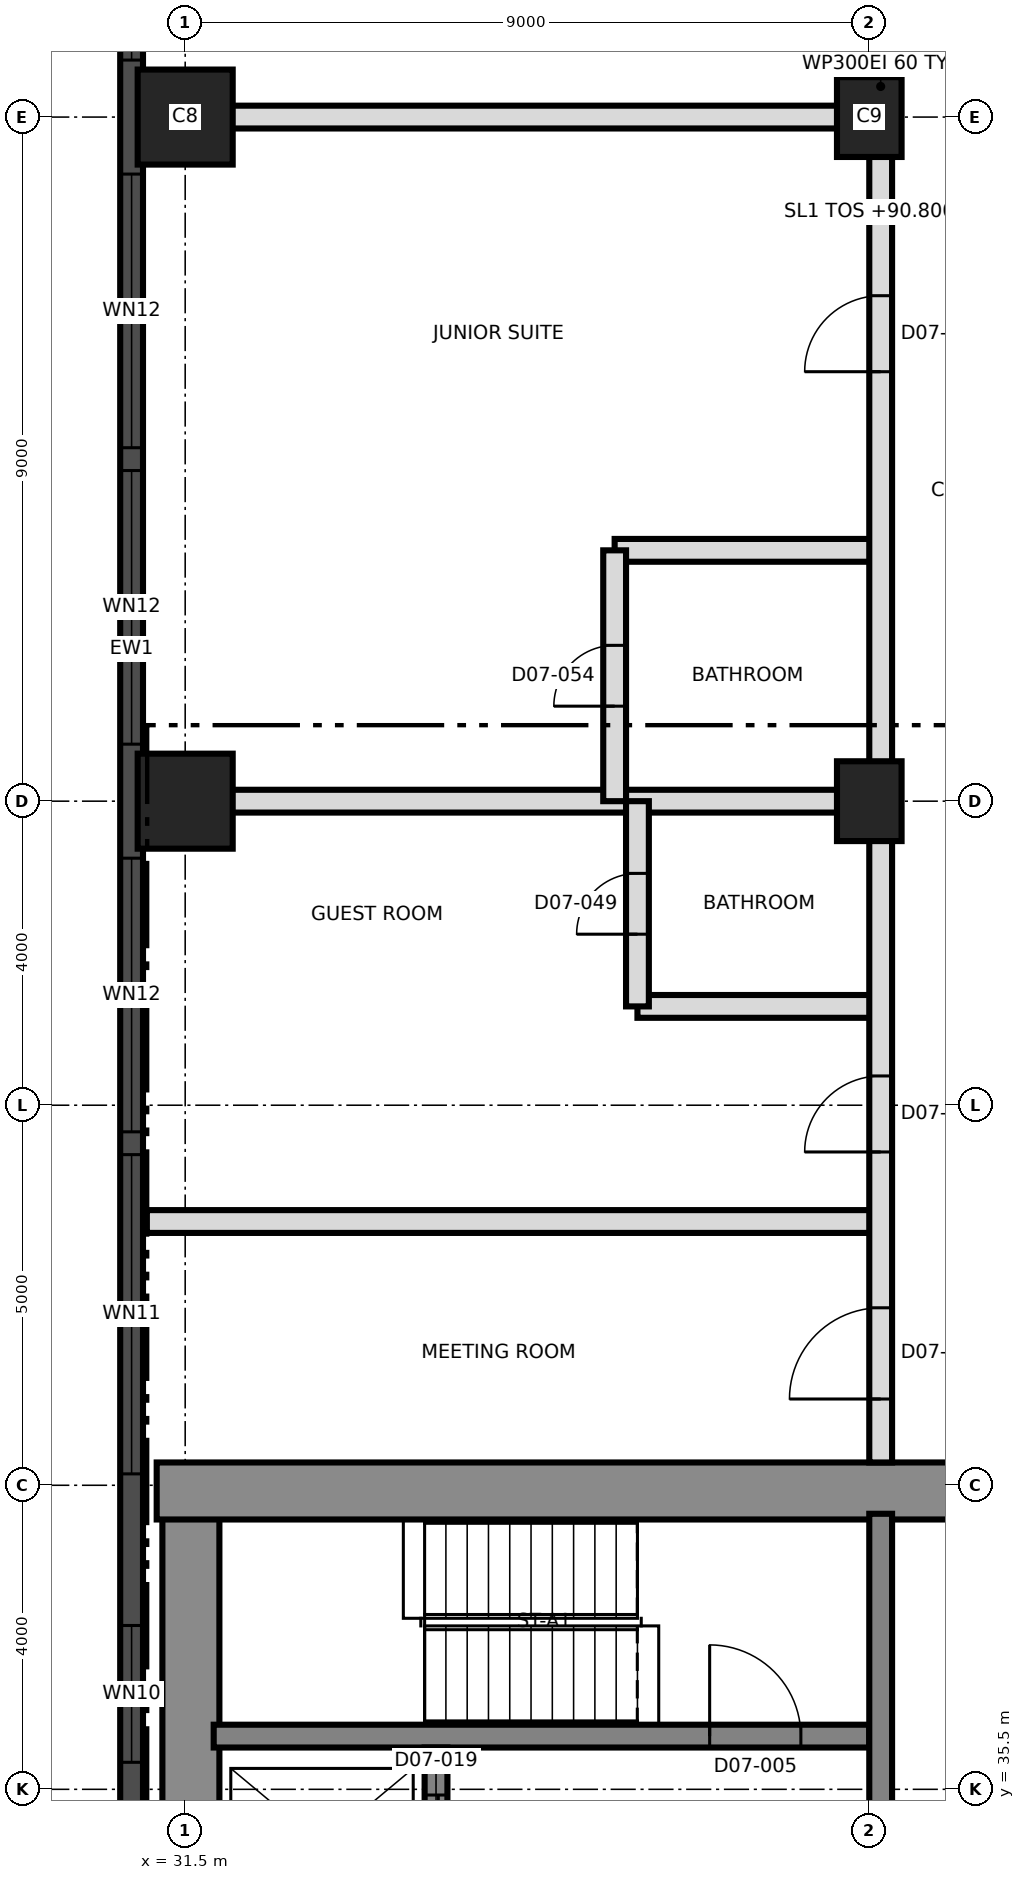
"""IFC4 building model, lengths in metres.
Left out: names, types, materials, properties, quantities, classifications, styles, units other than length and angle.
Written with IfcOpenShell. Run it as: python <this file> out.ifc"""

import sys

from ifc_helpers import new_model, si_unit, direction, frame, frame_2d, origin, origin_2d, place, context, subcontext, project, spatial, rectangle, extrude, element, fill, save


model = new_model("IFC4")
c1 = context("Model", 3, precision=1e-05, world=origin(), true_north=direction((0.0, 1.0)))
c2 = subcontext(c1, "Body", "Model", "MODEL_VIEW")
j1 = project(units=[si_unit("LENGTHUNIT", "METRE"), si_unit("PLANEANGLEUNIT", "RADIAN")], contexts=[c1])
p1 = place(None, origin())
s1 = spatial("IfcSite", under=j1, at=p1, CompositionType="ELEMENT")
p2 = place(p1, origin())
s2 = spatial("IfcBuilding", under=s1, at=p2, CompositionType="ELEMENT")
p3 = place(p2, frame((0.0, 0.0, 90.8)))
s3 = spatial("IfcBuildingStorey", under=s2, at=p3, CompositionType="ELEMENT", Elevation=90.8)
p4 = place(p3, frame((31.575, 21.875, 0.0), z_axis=(0.0, 0.0, 1.0), x_axis=(0.0, 1.0, 0.0)))
e1 = element("IfcWall", 1, at=p4, inside=s3, PredefinedType="SHEAR", context=c2, shape_type="SweptSolid", body=[
    extrude(rectangle(XDim=17.25, YDim=0.75, at=frame_2d((8.625, 0.0))), origin(), (0.0, 0.0, 1.0), 3.7),
])
p5 = place(p3, frame((31.125, 39.425, 0.0), z_axis=(0.0, 0.0, 1.0), x_axis=(1.0, 0.0, 0.0)))
e2 = element("IfcWall", 2, at=p5, inside=s3, PredefinedType="SHEAR", context=c2, shape_type="SweptSolid", body=[
    extrude(rectangle(XDim=27.0, YDim=0.75, at=frame_2d((13.5, 0.0))), origin(), (0.0, 0.0, 1.0), 3.7),
])
p6 = place(p5, frame((10.575, 0.0, 0.0)))
e3 = element("IfcOpeningElement", 3, at=p6, cuts=e2, PredefinedType="OPENING", context=c2, shape_type="SweptSolid", body=[
    extrude(rectangle(XDim=1.2, YDim=2.1, at=frame_2d((0.6, 1.05))), frame((0.0, 0.385, 0.0), z_axis=(0.0, -1.0, 0.0), x_axis=(1.0, 0.0, 0.0)), (0.0, 0.0, 1.0), 0.77),
])
p7 = place(p3, frame((31.875, 36.2, 0.0), z_axis=(0.0, 0.0, 1.0), x_axis=(1.0, 0.0, 0.0)))
e4 = element("IfcWall", 4, at=p7, inside=s3, PredefinedType="SHEAR", context=c2, shape_type="SweptSolid", body=[
    extrude(rectangle(XDim=8.625, YDim=0.3, at=frame_2d((4.312, 0.0))), origin(), (0.0, 0.0, 1.0), 3.7),
])
p8 = place(p7, frame((6.525, 0.0, 0.0)))
e5 = element("IfcOpeningElement", 5, at=p8, cuts=e4, PredefinedType="OPENING", context=c2, shape_type="SweptSolid", body=[
    extrude(rectangle(XDim=1.2, YDim=2.1, at=frame_2d((0.6, 1.05))), frame((0.0, 0.16, 0.0), z_axis=(0.0, -1.0, 0.0), x_axis=(1.0, 0.0, 0.0)), (0.0, 0.0, 1.0), 0.32),
])
p9 = place(p3, frame((40.65, 33.5, 0.0), z_axis=(0.0, 0.0, 1.0), x_axis=(0.0, 1.0, 0.0)))
e6 = element("IfcWall", 6, at=p9, inside=s3, PredefinedType="SHEAR", context=c2, shape_type="SweptSolid", body=[
    extrude(rectangle(XDim=5.625, YDim=0.3, at=frame_2d((2.812, 0.0))), origin(), (0.0, 0.0, 1.0), 3.7),
])
p10 = place(p3, frame((34.8, 33.5, 0.0), z_axis=(0.0, 0.0, 1.0), x_axis=(0.0, 1.0, 0.0)))
e7 = element("IfcWall", 7, at=p10, inside=s3, PredefinedType="SHEAR", context=c2, shape_type="SweptSolid", body=[
    extrude(rectangle(XDim=2.55, YDim=0.3, at=frame_2d((1.275, 0.0))), origin(), (0.0, 0.0, 1.0), 3.7),
])
p11 = place(p10, frame((0.625, 0.0, 0.0)))
e8 = element("IfcOpeningElement", 8, at=p11, cuts=e7, PredefinedType="OPENING", context=c2, shape_type="SweptSolid", body=[
    extrude(rectangle(XDim=1.3, YDim=2.4, at=frame_2d((0.65, 1.2))), frame((0.0, 0.16, 0.0), z_axis=(0.0, -1.0, 0.0), x_axis=(1.0, 0.0, 0.0)), (0.0, 0.0, 1.0), 0.32),
])
p12 = place(p3, frame((31.5, 48.5, 0.0), z_axis=(0.0, 0.0, 1.0), x_axis=(1.0, 0.0, 0.0)))
e9 = element("IfcColumn", 9, at=p12, inside=s3, PredefinedType="COLUMN", context=c2, shape_type="SweptSolid", body=[
    extrude(rectangle(XDim=1.25, YDim=1.25, at=origin_2d()), origin(), (0.0, 0.0, 1.0), 3.7),
])
p13 = place(p3, frame((40.5, 48.5, 0.0), z_axis=(0.0, 0.0, 1.0), x_axis=(0.0, 1.0, 0.0)))
e10 = element("IfcColumn", 10, at=p13, inside=s3, PredefinedType="COLUMN", context=c2, shape_type="SweptSolid", body=[
    extrude(rectangle(XDim=1.05, YDim=0.85, at=origin_2d()), origin(), (0.0, 0.0, 1.0), 3.7),
])
p14 = place(p3, frame((31.5, 57.5, 0.0), z_axis=(0.0, 0.0, 1.0), x_axis=(1.0, 0.0, 0.0)))
e11 = element("IfcColumn", 11, at=p14, inside=s3, PredefinedType="COLUMN", context=c2, shape_type="SweptSolid", body=[
    extrude(rectangle(XDim=1.25, YDim=1.25, at=origin_2d()), origin(), (0.0, 0.0, 1.0), 3.7),
])
p15 = place(p3, frame((40.5, 57.5, 0.0), z_axis=(0.0, 0.0, 1.0), x_axis=(0.0, 1.0, 0.0)))
e12 = element("IfcColumn", 12, at=p15, inside=s3, PredefinedType="COLUMN", context=c2, shape_type="SweptSolid", body=[
    extrude(rectangle(XDim=1.05, YDim=0.85, at=origin_2d()), origin(), (0.0, 0.0, 1.0), 3.7),
])
p16 = place(p3, frame((30.795, 66.992, 0.0), z_axis=(0.0, 0.0, 1.0), x_axis=(0.0, -1.0, 0.0)))
e13 = element("IfcWall", 13, at=p16, inside=s3, PredefinedType="SOLIDWALL", context=c2, shape_type="SweptSolid", body=[
    extrude(rectangle(XDim=32.981, YDim=0.3, at=frame_2d((16.491, 0.0))), origin(), (0.0, 0.0, 1.0), 3.4),
])
p17 = place(p16, frame((1.596, 0.0, 0.3)))
e14 = element("IfcOpeningElement", 14, at=p17, cuts=e13, PredefinedType="OPENING", context=c2, shape_type="SweptSolid", body=[
    extrude(rectangle(XDim=1.8, YDim=2.4, at=frame_2d((0.9, 1.2))), frame((0.0, 0.16, 0.0), z_axis=(0.0, -1.0, 0.0), x_axis=(1.0, 0.0, 0.0)), (0.0, 0.0, 1.0), 0.32),
])
p18 = place(p16, frame((5.142, 0.0, 0.9)))
e15 = element("IfcOpeningElement", 15, at=p18, cuts=e13, PredefinedType="OPENING", context=c2, shape_type="SweptSolid", body=[
    extrude(rectangle(XDim=3.6, YDim=1.5, at=frame_2d((1.8, 0.75))), frame((0.0, 0.16, 0.0), z_axis=(0.0, -1.0, 0.0), x_axis=(1.0, 0.0, 0.0)), (0.0, 0.0, 1.0), 0.32),
])
p19 = place(p16, frame((10.242, 0.0, 0.9)))
e16 = element("IfcOpeningElement", 16, at=p19, cuts=e13, PredefinedType="OPENING", context=c2, shape_type="SweptSolid", body=[
    extrude(rectangle(XDim=3.6, YDim=1.5, at=frame_2d((1.8, 0.75))), frame((0.0, 0.16, 0.0), z_axis=(0.0, -1.0, 0.0), x_axis=(1.0, 0.0, 0.0)), (0.0, 0.0, 1.0), 0.32),
])
p20 = place(p16, frame((14.142, 0.0, 0.9)))
e17 = element("IfcOpeningElement", 17, at=p20, cuts=e13, PredefinedType="OPENING", context=c2, shape_type="SweptSolid", body=[
    extrude(rectangle(XDim=3.6, YDim=1.5, at=frame_2d((1.8, 0.75))), frame((0.0, 0.16, 0.0), z_axis=(0.0, -1.0, 0.0), x_axis=(1.0, 0.0, 0.0)), (0.0, 0.0, 1.0), 0.32),
])
p21 = place(p16, frame((19.242, 0.0, 0.9)))
e18 = element("IfcOpeningElement", 18, at=p21, cuts=e13, PredefinedType="OPENING", context=c2, shape_type="SweptSolid", body=[
    extrude(rectangle(XDim=3.6, YDim=1.5, at=frame_2d((1.8, 0.75))), frame((0.0, 0.16, 0.0), z_axis=(0.0, -1.0, 0.0), x_axis=(1.0, 0.0, 0.0)), (0.0, 0.0, 1.0), 0.32),
])
p22 = place(p16, frame((23.142, 0.0, 0.9)))
e19 = element("IfcOpeningElement", 19, at=p22, cuts=e13, PredefinedType="OPENING", context=c2, shape_type="SweptSolid", body=[
    extrude(rectangle(XDim=4.2, YDim=1.5, at=frame_2d((2.1, 0.75))), frame((0.0, 0.16, 0.0), z_axis=(0.0, -1.0, 0.0), x_axis=(1.0, 0.0, 0.0)), (0.0, 0.0, 1.0), 0.32),
])
p23 = place(p16, frame((29.337, 0.0, 0.3)))
e20 = element("IfcOpeningElement", 20, at=p23, cuts=e13, PredefinedType="OPENING", context=c2, shape_type="SweptSolid", body=[
    extrude(rectangle(XDim=1.8, YDim=2.4, at=frame_2d((0.9, 1.2))), frame((0.0, 0.16, 0.0), z_axis=(0.0, -1.0, 0.0), x_axis=(1.0, 0.0, 0.0)), (0.0, 0.0, 1.0), 0.32),
])
p24 = place(p3, frame((30.995, 42.97, 0.0), z_axis=(0.0, 0.0, 1.0), x_axis=(1.0, 0.0, 0.0)))
e21 = element("IfcWall", 21, at=p24, inside=s3, PredefinedType="PARTITIONING", context=c2, shape_type="SweptSolid", body=[
    extrude(rectangle(XDim=9.655, YDim=0.3, at=frame_2d((4.827, 0.0))), origin(), (0.0, 0.0, 1.0), 3.4),
])
p25 = place(p3, frame((37.45, 45.8, 0.0), z_axis=(0.0, 0.0, 1.0), x_axis=(1.0, 0.0, 0.0)))
e22 = element("IfcWall", 22, at=p25, inside=s3, PredefinedType="PARTITIONING", context=c2, shape_type="SweptSolid", body=[
    extrude(rectangle(XDim=3.2, YDim=0.3, at=frame_2d((1.6, 0.0))), origin(), (0.0, 0.0, 1.0), 3.4),
])
p26 = place(p3, frame((30.995, 48.5, 0.0), z_axis=(0.0, 0.0, 1.0), x_axis=(1.0, 0.0, 0.0)))
e23 = element("IfcWall", 23, at=p26, inside=s3, PredefinedType="PARTITIONING", context=c2, shape_type="SweptSolid", body=[
    extrude(rectangle(XDim=9.655, YDim=0.3, at=frame_2d((4.827, 0.0))), origin(), (0.0, 0.0, 1.0), 3.4),
])
p27 = place(p3, frame((37.15, 51.8, 0.0), z_axis=(0.0, 0.0, 1.0), x_axis=(1.0, 0.0, 0.0)))
e24 = element("IfcWall", 24, at=p27, inside=s3, PredefinedType="PARTITIONING", context=c2, shape_type="SweptSolid", body=[
    extrude(rectangle(XDim=3.5, YDim=0.3, at=frame_2d((1.75, 0.0))), origin(), (0.0, 0.0, 1.0), 3.4),
])
p28 = place(p3, frame((30.995, 57.5, 0.0), z_axis=(0.0, 0.0, 1.0), x_axis=(1.0, 0.0, 0.0)))
e25 = element("IfcWall", 25, at=p28, inside=s3, PredefinedType="PARTITIONING", context=c2, shape_type="SweptSolid", body=[
    extrude(rectangle(XDim=9.655, YDim=0.3, at=frame_2d((4.827, 0.0))), origin(), (0.0, 0.0, 1.0), 3.4),
])
p29 = place(p3, frame((37.15, 48.5, 0.0), z_axis=(0.0, 0.0, 1.0), x_axis=(0.0, 1.0, 0.0)))
e26 = element("IfcWall", 26, at=p29, inside=s3, PredefinedType="PARTITIONING", context=c2, shape_type="SweptSolid", body=[
    extrude(rectangle(XDim=3.3, YDim=0.3, at=frame_2d((1.65, 0.0))), origin(), (0.0, 0.0, 1.0), 3.4),
])
p30 = place(p29, frame((1.25, 0.0, 0.0)))
e27 = element("IfcOpeningElement", 27, at=p30, cuts=e26, PredefinedType="OPENING", context=c2, shape_type="SweptSolid", body=[
    extrude(rectangle(XDim=0.8, YDim=2.1, at=frame_2d((0.4, 1.05))), frame((0.0, 0.16, 0.0), z_axis=(0.0, -1.0, 0.0), x_axis=(1.0, 0.0, 0.0)), (0.0, 0.0, 1.0), 0.32),
])
p31 = place(p3, frame((37.45, 45.8, 0.0), z_axis=(0.0, 0.0, 1.0), x_axis=(0.0, 1.0, 0.0)))
e28 = element("IfcWall", 28, at=p31, inside=s3, PredefinedType="PARTITIONING", context=c2, shape_type="SweptSolid", body=[
    extrude(rectangle(XDim=2.7, YDim=0.3, at=frame_2d((1.35, 0.0))), origin(), (0.0, 0.0, 1.0), 3.4),
])
p32 = place(p31, frame((0.95, 0.0, 0.0)))
e29 = element("IfcOpeningElement", 29, at=p32, cuts=e28, PredefinedType="OPENING", context=c2, shape_type="SweptSolid", body=[
    extrude(rectangle(XDim=0.8, YDim=2.1, at=frame_2d((0.4, 1.05))), frame((0.0, 0.16, 0.0), z_axis=(0.0, -1.0, 0.0), x_axis=(1.0, 0.0, 0.0)), (0.0, 0.0, 1.0), 0.32),
])
p33 = place(p3, frame((40.65, 39.8, 0.0), z_axis=(0.0, 0.0, 1.0), x_axis=(0.0, 1.0, 0.0)))
e30 = element("IfcWall", 30, at=p33, inside=s3, PredefinedType="PARTITIONING", context=c2, shape_type="SweptSolid", body=[
    extrude(rectangle(XDim=36.205, YDim=0.3, at=frame_2d((18.103, 0.0))), origin(), (0.0, 0.0, 1.0), 3.4),
])
p34 = place(p33, frame((0.835, 0.0, 0.0)))
e31 = element("IfcOpeningElement", 31, at=p34, cuts=e30, PredefinedType="OPENING", context=c2, shape_type="SweptSolid", body=[
    extrude(rectangle(XDim=1.2, YDim=2.1, at=frame_2d((0.6, 1.05))), frame((0.0, 0.16, 0.0), z_axis=(0.0, -1.0, 0.0), x_axis=(1.0, 0.0, 0.0)), (0.0, 0.0, 1.0), 0.32),
])
p35 = place(p33, frame((4.085, 0.0, 0.0)))
e32 = element("IfcOpeningElement", 32, at=p35, cuts=e30, PredefinedType="OPENING", context=c2, shape_type="SweptSolid", body=[
    extrude(rectangle(XDim=1.0, YDim=2.1, at=frame_2d((0.5, 1.05))), frame((0.0, 0.16, 0.0), z_axis=(0.0, -1.0, 0.0), x_axis=(1.0, 0.0, 0.0)), (0.0, 0.0, 1.0), 0.32),
])
p36 = place(p33, frame((14.35, 0.0, 0.0)))
e33 = element("IfcOpeningElement", 33, at=p36, cuts=e30, PredefinedType="OPENING", context=c2, shape_type="SweptSolid", body=[
    extrude(rectangle(XDim=1.0, YDim=2.4, at=frame_2d((0.5, 1.2))), frame((0.0, 0.16, 0.0), z_axis=(0.0, -1.0, 0.0), x_axis=(1.0, 0.0, 0.0)), (0.0, 0.0, 1.0), 0.32),
])
p37 = place(p33, frame((21.2, 0.0, 0.0)))
e34 = element("IfcOpeningElement", 34, at=p37, cuts=e30, PredefinedType="OPENING", context=c2, shape_type="SweptSolid", body=[
    extrude(rectangle(XDim=1.0, YDim=2.4, at=frame_2d((0.5, 1.2))), frame((0.0, 0.16, 0.0), z_axis=(0.0, -1.0, 0.0), x_axis=(1.0, 0.0, 0.0)), (0.0, 0.0, 1.0), 0.32),
])
p38 = place(p18, origin())
e35 = element("IfcWindow", 35, at=p38, inside=s3, PartitioningType="SINGLE_PANEL", PredefinedType="WINDOW", context=c2, shape_type="SweptSolid", body=[
    extrude(rectangle(XDim=3.6, YDim=1.5, at=frame_2d((1.8, 0.75))), frame((0.0, 0.03, 0.0), z_axis=(0.0, -1.0, 0.0), x_axis=(1.0, 0.0, 0.0)), (0.0, 0.0, 1.0), 0.06),
])
fill(e15, e35)
p39 = place(p19, origin())
e36 = element("IfcWindow", 36, at=p39, inside=s3, PartitioningType="SINGLE_PANEL", PredefinedType="WINDOW", context=c2, shape_type="SweptSolid", body=[
    extrude(rectangle(XDim=3.6, YDim=1.5, at=frame_2d((1.8, 0.75))), frame((0.0, 0.03, 0.0), z_axis=(0.0, -1.0, 0.0), x_axis=(1.0, 0.0, 0.0)), (0.0, 0.0, 1.0), 0.06),
])
fill(e16, e36)
p40 = place(p20, origin())
e37 = element("IfcWindow", 37, at=p40, inside=s3, PartitioningType="SINGLE_PANEL", PredefinedType="WINDOW", context=c2, shape_type="SweptSolid", body=[
    extrude(rectangle(XDim=3.6, YDim=1.5, at=frame_2d((1.8, 0.75))), frame((0.0, 0.03, 0.0), z_axis=(0.0, -1.0, 0.0), x_axis=(1.0, 0.0, 0.0)), (0.0, 0.0, 1.0), 0.06),
])
fill(e17, e37)
p41 = place(p21, origin())
e38 = element("IfcWindow", 38, at=p41, inside=s3, PartitioningType="SINGLE_PANEL", PredefinedType="WINDOW", context=c2, shape_type="SweptSolid", body=[
    extrude(rectangle(XDim=3.6, YDim=1.5, at=frame_2d((1.8, 0.75))), frame((0.0, 0.03, 0.0), z_axis=(0.0, -1.0, 0.0), x_axis=(1.0, 0.0, 0.0)), (0.0, 0.0, 1.0), 0.06),
])
fill(e18, e38)
p42 = place(p22, origin())
e39 = element("IfcWindow", 39, at=p42, inside=s3, PartitioningType="SINGLE_PANEL", PredefinedType="WINDOW", context=c2, shape_type="SweptSolid", body=[
    extrude(rectangle(XDim=4.2, YDim=1.5, at=frame_2d((2.1, 0.75))), frame((0.0, 0.03, 0.0), z_axis=(0.0, -1.0, 0.0), x_axis=(1.0, 0.0, 0.0)), (0.0, 0.0, 1.0), 0.06),
])
fill(e19, e39)
p43 = place(p23, origin())
e40 = element("IfcWindow", 40, at=p43, inside=s3, PartitioningType="SINGLE_PANEL", PredefinedType="WINDOW", context=c2, shape_type="SweptSolid", body=[
    extrude(rectangle(XDim=1.8, YDim=2.4, at=frame_2d((0.9, 1.2))), frame((0.0, 0.03, 0.0), z_axis=(0.0, -1.0, 0.0), x_axis=(1.0, 0.0, 0.0)), (0.0, 0.0, 1.0), 0.06),
])
fill(e20, e40)
p44 = place(p8, origin())
e41 = element("IfcDoor", 41, at=p44, inside=s3, OperationType="SINGLE_SWING_RIGHT", PredefinedType="DOOR", context=c2, shape_type="SweptSolid", body=[
    extrude(rectangle(XDim=1.2, YDim=2.1, at=frame_2d((0.6, 1.05))), frame((0.0, 0.025, 0.0), z_axis=(0.0, -1.0, 0.0), x_axis=(1.0, 0.0, 0.0)), (0.0, 0.0, 1.0), 0.05),
])
fill(e5, e41)
p45 = place(p11, origin())
e42 = element("IfcDoor", 42, at=p45, inside=s3, OperationType="SLIDING_TO_LEFT", PredefinedType="DOOR", context=c2, shape_type="SweptSolid", body=[
    extrude(rectangle(XDim=1.3, YDim=2.4, at=frame_2d((0.65, 1.2))), frame((0.0, 0.025, 0.0), z_axis=(0.0, -1.0, 0.0), x_axis=(1.0, 0.0, 0.0)), (0.0, 0.0, 1.0), 0.05),
])
fill(e8, e42)
p46 = place(p34, origin())
e43 = element("IfcDoor", 43, at=p46, inside=s3, OperationType="SINGLE_SWING_LEFT", PredefinedType="DOOR", context=c2, shape_type="SweptSolid", body=[
    extrude(rectangle(XDim=1.2, YDim=2.1, at=frame_2d((0.6, 1.05))), frame((0.0, 0.025, 0.0), z_axis=(0.0, -1.0, 0.0), x_axis=(1.0, 0.0, 0.0)), (0.0, 0.0, 1.0), 0.05),
])
fill(e31, e43)
p47 = place(p32, origin())
e44 = element("IfcDoor", 44, at=p47, inside=s3, OperationType="SINGLE_SWING_LEFT", PredefinedType="DOOR", context=c2, shape_type="SweptSolid", body=[
    extrude(rectangle(XDim=0.8, YDim=2.1, at=frame_2d((0.4, 1.05))), frame((0.0, 0.025, 0.0), z_axis=(0.0, -1.0, 0.0), x_axis=(1.0, 0.0, 0.0)), (0.0, 0.0, 1.0), 0.05),
])
fill(e29, e44)
p48 = place(p35, origin())
e45 = element("IfcDoor", 45, at=p48, inside=s3, OperationType="SINGLE_SWING_RIGHT", PredefinedType="DOOR", context=c2, shape_type="SweptSolid", body=[
    extrude(rectangle(XDim=1.0, YDim=2.1, at=frame_2d((0.5, 1.05))), frame((0.0, 0.025, 0.0), z_axis=(0.0, -1.0, 0.0), x_axis=(1.0, 0.0, 0.0)), (0.0, 0.0, 1.0), 0.05),
])
fill(e32, e45)
p49 = place(p30, origin())
e46 = element("IfcDoor", 46, at=p49, inside=s3, OperationType="SINGLE_SWING_RIGHT", PredefinedType="DOOR", context=c2, shape_type="SweptSolid", body=[
    extrude(rectangle(XDim=0.8, YDim=2.1, at=frame_2d((0.4, 1.05))), frame((0.0, 0.025, 0.0), z_axis=(0.0, -1.0, 0.0), x_axis=(1.0, 0.0, 0.0)), (0.0, 0.0, 1.0), 0.05),
])
fill(e27, e46)
p50 = place(p36, origin())
e47 = element("IfcDoor", 47, at=p50, inside=s3, OperationType="SINGLE_SWING_LEFT", PredefinedType="DOOR", context=c2, shape_type="SweptSolid", body=[
    extrude(rectangle(XDim=1.0, YDim=2.4, at=frame_2d((0.5, 1.2))), frame((0.0, 0.025, 0.0), z_axis=(0.0, -1.0, 0.0), x_axis=(1.0, 0.0, 0.0)), (0.0, 0.0, 1.0), 0.05),
])
fill(e33, e47)
save(model, sys.argv[1])
